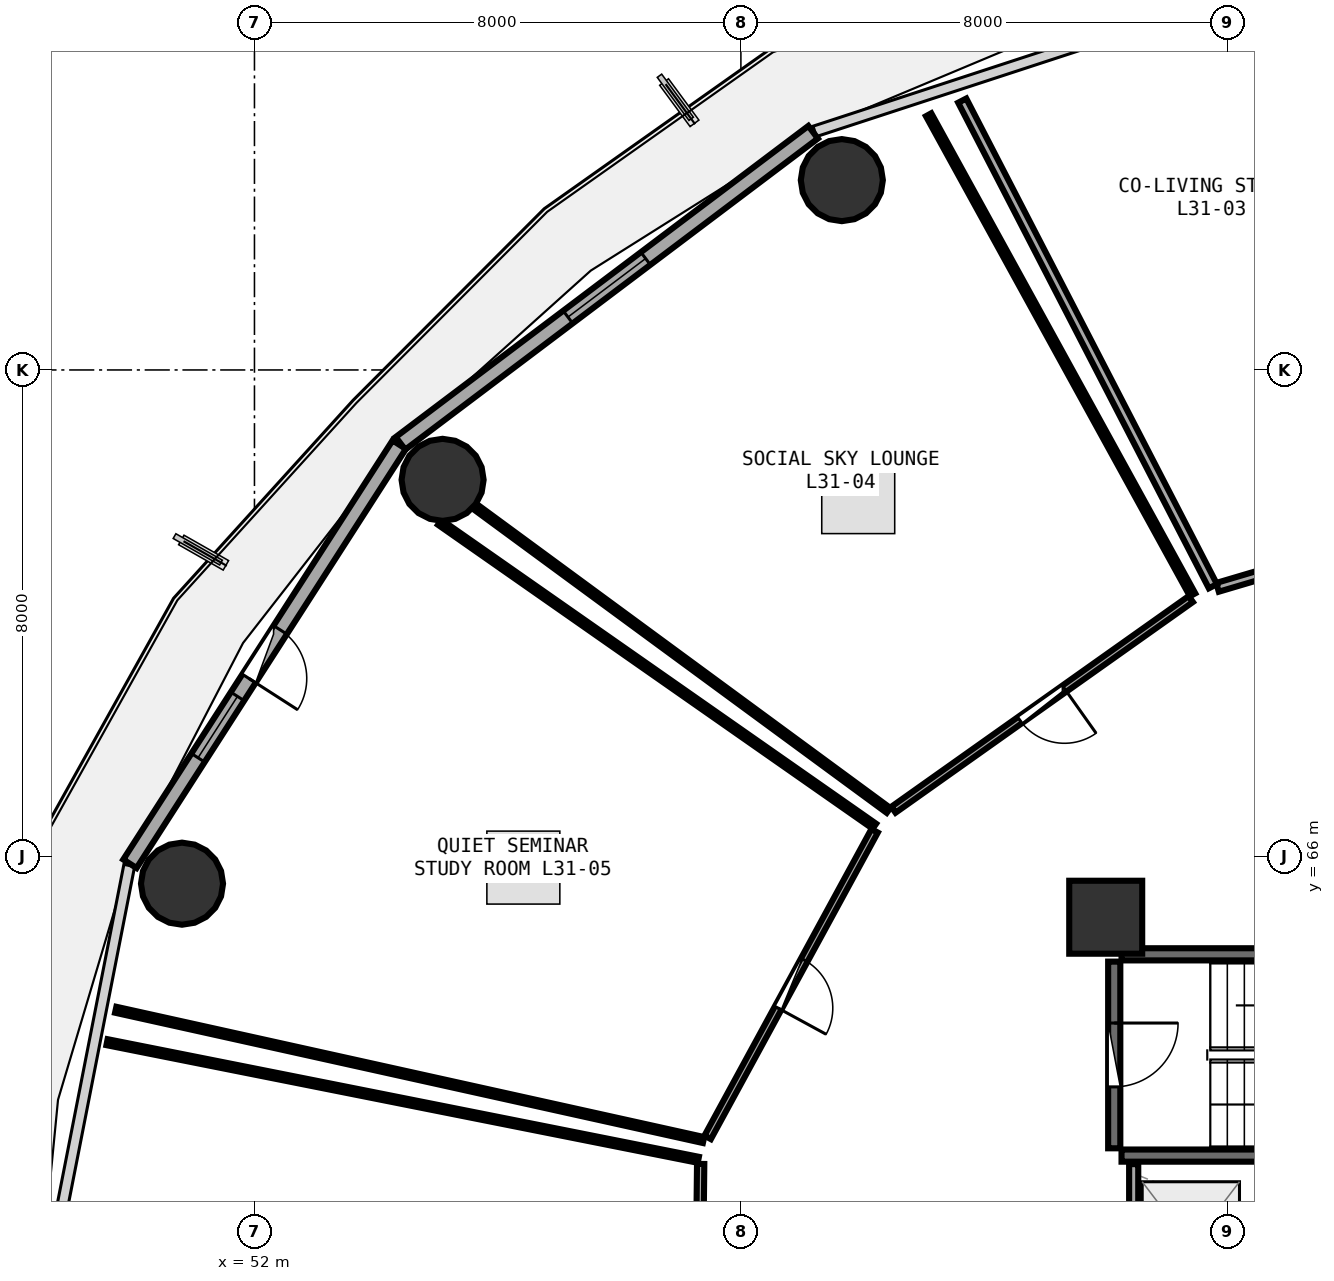
"""IFC4 building model, lengths in metres.
Left out: names, types, materials, properties, quantities, classifications, styles, units other than length and angle.
Written with IfcOpenShell. Run it as: python <this file> out.ifc"""

import sys

from ifc_helpers import new_model, si_unit, direction, frame, frame_2d, origin, origin_2d, place, context, subcontext, project, spatial, rectangle, circle, extrude, element, fill, save


model = new_model("IFC4")
c1 = context("Model", 3, precision=1e-05, world=origin(), true_north=direction((0.0, 1.0)))
c2 = subcontext(c1, "Body", "Model", "MODEL_VIEW")
j1 = project(units=[si_unit("LENGTHUNIT", "METRE"), si_unit("PLANEANGLEUNIT", "RADIAN")], contexts=[c1])
p1 = place(None, origin())
s1 = spatial("IfcSite", under=j1, at=p1, CompositionType="ELEMENT")
p2 = place(p1, origin())
s2 = spatial("IfcBuilding", under=s1, at=p2, CompositionType="ELEMENT")
p3 = place(p2, frame((0.0, 0.0, 121.35)))
s3 = spatial("IfcBuildingStorey", under=s2, at=p3, CompositionType="ELEMENT", Elevation=121.35)
p4 = place(p3, frame((66.0, 65.0, 0.0), z_axis=(0.0, 0.0, 1.0), x_axis=(1.0, 0.0, 0.0)))
e1 = element("IfcColumn", 1, at=p4, inside=s3, PredefinedType="PILASTER", context=c2, shape_type="SweptSolid", body=[
    extrude(rectangle(XDim=1.2, YDim=1.2, at=origin_2d()), origin(), (0.0, 0.0, 1.0), 3.75),
])
for number, where, z_axis, x_axis in (
    (2, (61.66, 77.122, 0.0), (0.0, 0.0, 1.0), (1.0, 0.0, 0.0)),
    (3, (55.094, 72.193, 0.0), (0.0, 0.0, 1.0), (1.0, 0.0, 0.0)),
    (4, (50.808, 65.552, 0.0), (0.0, 0.0, 1.0), (1.0, 0.0, 0.0)),
):
    element("IfcColumn", number, at=place(p3, frame(where, z_axis=z_axis, x_axis=x_axis)), inside=s3, PredefinedType="COLUMN", context=c2, shape_type="SweptSolid", body=[
        extrude(circle(Radius=0.675, at=origin_2d()), origin(), (0.0, 0.0, 1.0), 3.75),
    ])
p5 = place(p3, frame((61.188, 77.91, 0.0), z_axis=(0.0, 0.0, 1.0), x_axis=(-0.798501507879, -0.601992808857, 0.0)))
e5 = element("IfcWall", 5, at=p5, inside=s3, PredefinedType="SOLIDWALL", context=c2, shape_type="SweptSolid", body=[
    extrude(rectangle(XDim=8.499, YDim=0.26, at=frame_2d((4.25, 0.0))), origin(), (0.0, 0.0, 1.0), 3.475),
])
p6 = place(p5, frame((3.45, 0.0, 0.85)))
e6 = element("IfcOpeningElement", 6, at=p6, cuts=e5, PredefinedType="OPENING", context=c2, shape_type="SweptSolid", body=[
    extrude(rectangle(XDim=1.6, YDim=1.45, at=frame_2d((0.8, 0.725))), frame((0.0, 0.14, 0.0), z_axis=(0.0, -1.0, 0.0), x_axis=(1.0, 0.0, 0.0)), (0.0, 0.0, 1.0), 0.28),
])
p7 = place(p3, frame((54.381, 72.771, 0.0), z_axis=(0.0, 0.0, 1.0), x_axis=(-0.540620528459, -0.841266571432, 0.0)))
e7 = element("IfcWall", 7, at=p7, inside=s3, PredefinedType="SOLIDWALL", context=c2, shape_type="SweptSolid", body=[
    extrude(rectangle(XDim=8.193, YDim=0.26, at=frame_2d((4.096, 0.0))), origin(), (0.0, 0.0, 1.0), 3.475),
])
p8 = place(p7, frame((3.621, 0.0, 0.0)))
e8 = element("IfcOpeningElement", 8, at=p8, cuts=e7, PredefinedType="OPENING", context=c2, shape_type="SweptSolid", body=[
    extrude(rectangle(XDim=0.95, YDim=2.1, at=frame_2d((0.475, 1.05))), frame((0.0, 0.14, 0.0), z_axis=(0.0, -1.0, 0.0), x_axis=(1.0, 0.0, 0.0)), (0.0, 0.0, 1.0), 0.28),
])
p9 = place(p7, frame((4.921, 0.0, 0.85)))
e9 = element("IfcOpeningElement", 9, at=p9, cuts=e7, PredefinedType="OPENING", context=c2, shape_type="SweptSolid", body=[
    extrude(rectangle(XDim=1.2, YDim=1.45, at=frame_2d((0.6, 0.725))), frame((0.0, 0.14, 0.0), z_axis=(0.0, -1.0, 0.0), x_axis=(1.0, 0.0, 0.0)), (0.0, 0.0, 1.0), 0.28),
])
for number, where, z_axis, x_axis in (
    (10, (66.26, 61.08, 0.0), (0.0, 0.0, 1.0), (1.0, 0.0, 0.0)),
    (11, (73.42, 64.39, 0.0), (0.0, 0.0, 1.0), (-1.0, 0.0, 0.0)),
):
    element("IfcWall", number, at=place(p3, frame(where, z_axis=z_axis, x_axis=x_axis)), inside=s3, PredefinedType="SHEAR", context=c2, shape_type="SweptSolid", body=[
        extrude(rectangle(XDim=7.16, YDim=0.2, at=frame_2d((3.58, 0.0))), origin(), (0.0, 0.0, 1.0), 3.49),
    ])
p10 = place(p3, frame((66.14, 64.27, 0.0), z_axis=(0.0, 0.0, 1.0), x_axis=(0.0, -1.0, 0.0)))
e12 = element("IfcWall", 12, at=p10, inside=s3, PredefinedType="SHEAR", context=c2, shape_type="SweptSolid", body=[
    extrude(rectangle(XDim=3.07, YDim=0.2, at=frame_2d((1.535, 0.0))), origin(), (0.0, 0.0, 1.0), 3.49),
])
p11 = place(p10, frame((1.01, 0.0, 0.0)))
e13 = element("IfcOpeningElement", 13, at=p11, cuts=e12, PredefinedType="OPENING", context=c2, shape_type="SweptSolid", body=[
    extrude(rectangle(XDim=1.05, YDim=2.1, at=frame_2d((0.525, 1.05))), frame((0.0, 0.11, 0.0), z_axis=(0.0, -1.0, 0.0), x_axis=(1.0, 0.0, 0.0)), (0.0, 0.0, 1.0), 0.22),
])
p12 = place(p3, frame((66.46, 58.48, 0.0), z_axis=(0.0, 0.0, 1.0), x_axis=(0.0, 1.0, 0.0)))
e14 = element("IfcWall", 14, at=p12, inside=s3, PredefinedType="PARTITIONING", context=c2, shape_type="SweptSolid", body=[
    extrude(rectangle(XDim=2.46, YDim=0.15, at=frame_2d((1.23, 0.0))), origin(), (0.0, 0.0, 1.0), 3.48),
])
p13 = place(p3, frame((70.9, 71.331, 0.0), z_axis=(0.0, 0.0, 1.0), x_axis=(-0.958905255717, -0.283726471373, 0.0)))
e15 = element("IfcWall", 15, at=p13, inside=s3, PredefinedType="PARTITIONING", context=c2, shape_type="SweptSolid", body=[
    extrude(rectangle(XDim=3.193, YDim=0.15, at=frame_2d((1.597, 0.0))), origin(), (0.0, 0.0, 1.0), 2.925),
])
p14 = place(p13, frame((1.122, 0.0, 0.0)))
e16 = element("IfcOpeningElement", 16, at=p14, cuts=e15, PredefinedType="OPENING", context=c2, shape_type="SweptSolid", body=[
    extrude(rectangle(XDim=0.95, YDim=2.08, at=frame_2d((0.475, 1.04))), frame((0.0, 0.085, 0.0), z_axis=(0.0, -1.0, 0.0), x_axis=(1.0, 0.0, 0.0)), (0.0, 0.0, 1.0), 0.17),
])
p15 = place(p3, frame((67.399, 70.232, 0.0), z_axis=(0.0, 0.0, 1.0), x_axis=(-0.815932399176, -0.578147316846, 0.0)))
e17 = element("IfcWall", 17, at=p15, inside=s3, PredefinedType="PARTITIONING", context=c2, shape_type="SweptSolid", body=[
    extrude(rectangle(XDim=5.993, YDim=0.12, at=frame_2d((2.997, 0.0))), origin(), (0.0, 0.0, 1.0), 2.925),
])
p16 = place(p15, frame((2.546, 0.0, 0.0)))
e18 = element("IfcOpeningElement", 18, at=p16, cuts=e17, PredefinedType="OPENING", context=c2, shape_type="SweptSolid", body=[
    extrude(rectangle(XDim=0.9, YDim=2.08, at=frame_2d((0.45, 1.04))), frame((0.0, 0.07, 0.0), z_axis=(0.0, -1.0, 0.0), x_axis=(1.0, 0.0, 0.0)), (0.0, 0.0, 1.0), 0.14),
])
p17 = place(p3, frame((62.199, 66.421, 0.0), z_axis=(0.0, 0.0, 1.0), x_axis=(-0.478256103777, -0.878220416069, 0.0)))
e19 = element("IfcWall", 19, at=p17, inside=s3, PredefinedType="PARTITIONING", context=c2, shape_type="SweptSolid", body=[
    extrude(rectangle(XDim=5.741, YDim=0.12, at=frame_2d((2.871, 0.0))), origin(), (0.0, 0.0, 1.0), 2.925),
])
p18 = place(p17, frame((2.42, 0.0, 0.0)))
e20 = element("IfcOpeningElement", 20, at=p18, cuts=e19, PredefinedType="OPENING", context=c2, shape_type="SweptSolid", body=[
    extrude(rectangle(XDim=0.9, YDim=2.08, at=frame_2d((0.45, 1.04))), frame((0.0, 0.07, 0.0), z_axis=(0.0, -1.0, 0.0), x_axis=(1.0, 0.0, 0.0)), (0.0, 0.0, 1.0), 0.14),
])
p19 = place(p3, frame((59.338, 60.943, 0.0), z_axis=(0.0, 0.0, 1.0), x_axis=(-0.010989779386, -0.999939610551, 0.0)))
e21 = element("IfcWall", 21, at=p19, inside=s3, PredefinedType="PARTITIONING", context=c2, shape_type="SweptSolid", body=[
    extrude(rectangle(XDim=5.62, YDim=0.12, at=frame_2d((2.81, 0.0))), origin(), (0.0, 0.0, 1.0), 2.925),
])
p20 = place(p19, frame((2.36, 0.0, 0.0)))
e22 = element("IfcOpeningElement", 22, at=p20, cuts=e21, PredefinedType="OPENING", context=c2, shape_type="SweptSolid", body=[
    extrude(rectangle(XDim=0.9, YDim=2.08, at=frame_2d((0.45, 1.04))), frame((0.0, 0.07, 0.0), z_axis=(0.0, -1.0, 0.0), x_axis=(1.0, 0.0, 0.0)), (0.0, 0.0, 1.0), 0.14),
])
p21 = place(p3, frame((67.763, 70.444, 0.0), z_axis=(0.0, 0.0, 1.0), x_axis=(-0.458694817529, 0.888593869196, 0.0)))
e23 = element("IfcWall", 23, at=p21, inside=s3, PredefinedType="PARTITIONING", context=c2, shape_type="SweptSolid", body=[
    extrude(rectangle(XDim=8.987, YDim=0.15, at=frame_2d((4.494, 0.0))), origin(), (0.0, 0.0, 1.0), 2.975),
])
p22 = place(p3, frame((62.428, 66.757, 0.0), z_axis=(0.0, 0.0, 1.0), x_axis=(-0.805852200235, 0.592116737963, 0.0)))
e24 = element("IfcWall", 24, at=p22, inside=s3, PredefinedType="PARTITIONING", context=c2, shape_type="SweptSolid", body=[
    extrude(rectangle(XDim=8.43, YDim=0.1, at=frame_2d((4.215, 0.0))), origin(), (0.0, 0.0, 1.0), 2.925),
])
p23 = place(p3, frame((63.087, 78.197, 0.0), z_axis=(0.0, 0.0, 1.0), x_axis=(0.481837612944, -0.876260529039, 0.0)))
e25 = element("IfcWall", 25, at=p23, inside=s3, PredefinedType="PARTITIONING", context=c2, shape_type="SweptSolid", body=[
    extrude(rectangle(XDim=9.01, YDim=0.1, at=frame_2d((4.505, 0.0))), origin(), (0.0, 0.0, 1.0), 2.975),
])
p24 = place(p3, frame((59.386, 61.336, 0.0), z_axis=(0.0, 0.0, 1.0), x_axis=(-0.976312199438, 0.216366562178, 0.0)))
e26 = element("IfcWall", 26, at=p24, inside=s3, PredefinedType="PARTITIONING", context=c2, shape_type="SweptSolid", body=[
    extrude(rectangle(XDim=9.903, YDim=0.1, at=frame_2d((4.951, 0.0))), origin(), (0.0, 0.0, 1.0), 2.975),
])
p25 = place(p3, frame((55.047, 71.494, 0.0), z_axis=(0.0, 0.0, 1.0), x_axis=(0.8195552972, -0.573000100201, 0.0)))
e27 = element("IfcWall", 27, at=p25, inside=s3, PredefinedType="PARTITIONING", context=c2, shape_type="SweptSolid", body=[
    extrude(rectangle(XDim=8.722, YDim=0.1, at=frame_2d((4.361, 0.0))), origin(), (0.0, 0.0, 1.0), 3.175),
])
p26 = place(p3, frame((49.575, 62.945, 0.0), z_axis=(0.0, 0.0, 1.0), x_axis=(0.980780933509, -0.195112174059, 0.0)))
e28 = element("IfcWall", 28, at=p26, inside=s3, PredefinedType="PARTITIONING", context=c2, shape_type="SweptSolid", body=[
    extrude(rectangle(XDim=9.915, YDim=0.1, at=frame_2d((4.958, 0.0))), origin(), (0.0, 0.0, 1.0), 2.975),
])
p27 = place(p6, origin())
e29 = element("IfcWindow", 29, at=p27, inside=s3, PartitioningType="SINGLE_PANEL", PredefinedType="WINDOW", context=c2, shape_type="SweptSolid", body=[
    extrude(rectangle(XDim=1.6, YDim=1.45, at=frame_2d((0.8, 0.725))), frame((0.0, 0.03, 0.0), z_axis=(0.0, -1.0, 0.0), x_axis=(1.0, 0.0, 0.0)), (0.0, 0.0, 1.0), 0.06),
])
fill(e6, e29)
p28 = place(p8, frame((0.95, 0.0, 0.0), z_axis=(0.0, 0.0, 1.0), x_axis=(-1.0, 0.0, 0.0)))
e30 = element("IfcDoor", 30, at=p28, inside=s3, OperationType="SINGLE_SWING_LEFT", PredefinedType="DOOR", context=c2, shape_type="SweptSolid", body=[
    extrude(rectangle(XDim=0.95, YDim=2.1, at=frame_2d((0.475, 1.05))), frame((0.0, 0.025, 0.0), z_axis=(0.0, -1.0, 0.0), x_axis=(1.0, 0.0, 0.0)), (0.0, 0.0, 1.0), 0.05),
])
fill(e8, e30)
p29 = place(p9, origin())
e31 = element("IfcWindow", 31, at=p29, inside=s3, PartitioningType="SINGLE_PANEL", PredefinedType="WINDOW", context=c2, shape_type="SweptSolid", body=[
    extrude(rectangle(XDim=1.2, YDim=1.45, at=frame_2d((0.6, 0.725))), frame((0.0, 0.03, 0.0), z_axis=(0.0, -1.0, 0.0), x_axis=(1.0, 0.0, 0.0)), (0.0, 0.0, 1.0), 0.06),
])
fill(e9, e31)
p30 = place(p11, origin())
e32 = element("IfcDoor", 32, at=p30, inside=s3, OperationType="SINGLE_SWING_LEFT", PredefinedType="DOOR", context=c2, shape_type="SweptSolid", body=[
    extrude(rectangle(XDim=1.05, YDim=2.1, at=frame_2d((0.525, 1.05))), frame((0.0, 0.025, 0.0), z_axis=(0.0, -1.0, 0.0), x_axis=(1.0, 0.0, 0.0)), (0.0, 0.0, 1.0), 0.05),
])
fill(e13, e32)
p31 = place(p16, origin())
e33 = element("IfcDoor", 33, at=p31, inside=s3, OperationType="SINGLE_SWING_LEFT", PredefinedType="DOOR", context=c2, shape_type="SweptSolid", body=[
    extrude(rectangle(XDim=0.9, YDim=2.08, at=frame_2d((0.45, 1.04))), frame((0.0, 0.025, 0.0), z_axis=(0.0, -1.0, 0.0), x_axis=(1.0, 0.0, 0.0)), (0.0, 0.0, 1.0), 0.05),
])
fill(e18, e33)
p32 = place(p18, origin())
e34 = element("IfcDoor", 34, at=p32, inside=s3, OperationType="SINGLE_SWING_RIGHT", PredefinedType="DOOR", context=c2, shape_type="SweptSolid", body=[
    extrude(rectangle(XDim=0.9, YDim=2.08, at=frame_2d((0.45, 1.04))), frame((0.0, 0.025, 0.0), z_axis=(0.0, -1.0, 0.0), x_axis=(1.0, 0.0, 0.0)), (0.0, 0.0, 1.0), 0.05),
])
fill(e20, e34)
save(model, sys.argv[1])
